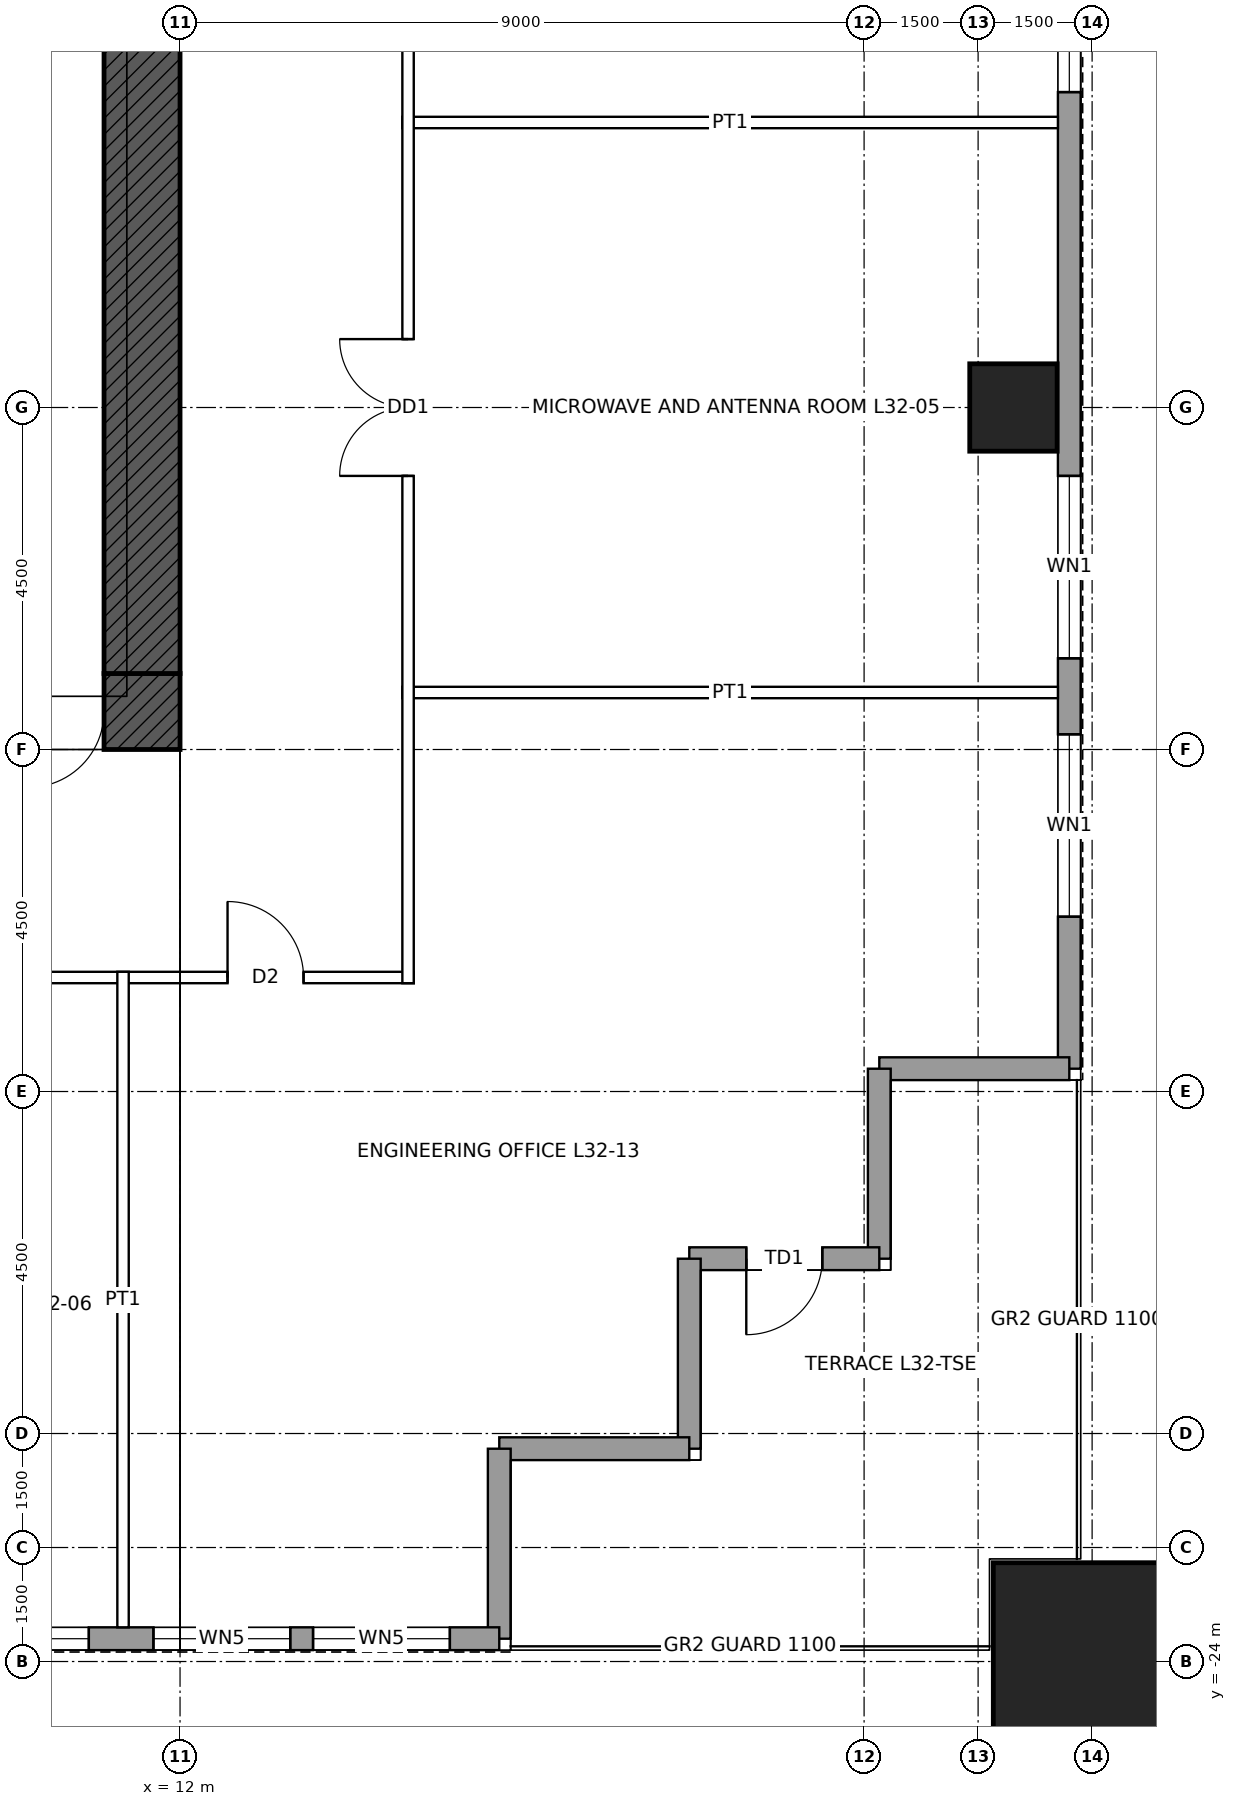
"""IFC4 building model, lengths in metres.
Left out: names, types, materials, properties, quantities, classifications, styles, units other than length and angle.
Written with IfcOpenShell. Run it as: python <this file> out.ifc"""

import sys

from ifc_helpers import new_model, si_unit, direction, frame, frame_2d, origin, origin_2d, place, context, subcontext, project, spatial, rectangle, hollow_rectangle, extrude, element, fill, save


model = new_model("IFC4")
c1 = context("Model", 3, precision=1e-05, world=origin(), true_north=direction((0.0, 1.0)))
c2 = subcontext(c1, "Body", "Model", "MODEL_VIEW")
j1 = project(units=[si_unit("LENGTHUNIT", "METRE"), si_unit("PLANEANGLEUNIT", "RADIAN")], contexts=[c1])
p1 = place(None, origin())
s1 = spatial("IfcSite", under=j1, at=p1, CompositionType="ELEMENT")
p2 = place(p1, origin())
s2 = spatial("IfcBuilding", under=s1, at=p2, CompositionType="ELEMENT")
p3 = place(p2, frame((0.0, 0.0, 158.4)))
s3 = spatial("IfcBuildingStorey", under=s2, at=p3, CompositionType="ELEMENT", Elevation=158.4)
p4 = place(p3, frame((24.0, -24.0, 0.0), z_axis=(0.0, 0.0, 1.0), x_axis=(1.0, 0.0, 0.0)))
e1 = element("IfcColumn", 1, at=p4, inside=s3, PredefinedType="COLUMN", context=c2, shape_type="SweptSolid", body=[
    extrude(hollow_rectangle(XDim=2.6, YDim=2.6, WallThickness=0.13, at=origin_2d()), origin(), (0.0, 0.0, 1.0), 4.5),
])
p5 = place(p3, frame((22.965, -7.5, 0.0), z_axis=(0.0, 0.0, 1.0), x_axis=(1.0, 0.0, 0.0)))
e2 = element("IfcColumn", 2, at=p5, inside=s3, PredefinedType="COLUMN", context=c2, shape_type="SweptSolid", body=[
    extrude(hollow_rectangle(XDim=1.15, YDim=1.15, WallThickness=0.075, at=origin_2d()), origin(), (0.0, 0.0, 1.0), 4.5),
])
p6 = place(p3, frame((12.0, -11.5, 0.0), z_axis=(0.0, 0.0, 1.0), x_axis=(-1.0, 0.0, 0.0)))
e3 = element("IfcWall", 3, at=p6, inside=s3, PredefinedType="SHEAR", context=c2, shape_type="SweptSolid", body=[
    extrude(rectangle(XDim=24.0, YDim=1.0, at=frame_2d((12.0, 0.0))), origin(), (0.0, 0.0, 1.0), 4.5),
])
p7 = place(p6, frame((11.5, 0.0, 0.0)))
e4 = element("IfcOpeningElement", 4, at=p7, cuts=e3, PredefinedType="OPENING", context=c2, shape_type="SweptSolid", body=[
    extrude(rectangle(XDim=1.0, YDim=2.1, at=frame_2d((0.5, 1.05))), frame((0.0, 0.51, 0.0), z_axis=(0.0, -1.0, 0.0), x_axis=(1.0, 0.0, 0.0)), (0.0, 0.0, 1.0), 1.02),
])
p8 = place(p6, frame((1.0, 0.0, 0.0)))
e5 = element("IfcOpeningElement", 5, at=p8, cuts=e3, PredefinedType="OPENING", context=c2, shape_type="SweptSolid", body=[
    extrude(rectangle(XDim=1.0, YDim=2.4, at=frame_2d((0.5, 1.2))), frame((0.0, 0.51, 0.0), z_axis=(0.0, -1.0, 0.0), x_axis=(1.0, 0.0, 0.0)), (0.0, 0.0, 1.0), 1.02),
])
p9 = place(p3, frame((11.5, 11.0, 0.0), z_axis=(0.0, 0.0, 1.0), x_axis=(0.0, -1.0, 0.0)))
e6 = element("IfcWall", 6, at=p9, inside=s3, PredefinedType="SHEAR", context=c2, shape_type="SweptSolid", body=[
    extrude(rectangle(XDim=22.0, YDim=1.0, at=frame_2d((11.0, 0.0))), origin(), (0.0, 0.0, 1.0), 4.5),
])
p10 = place(p9, frame((10.5, 0.0, 0.0)))
e7 = element("IfcOpeningElement", 7, at=p10, cuts=e6, PredefinedType="OPENING", context=c2, shape_type="SweptSolid", body=[
    extrude(rectangle(XDim=1.0, YDim=2.4, at=frame_2d((0.5, 1.2))), frame((0.0, 0.51, 0.0), z_axis=(0.0, -1.0, 0.0), x_axis=(1.0, 0.0, 0.0)), (0.0, 0.0, 1.0), 1.02),
])
p11 = place(p3, frame((23.7, 16.2, 0.0), z_axis=(0.0, 0.0, 1.0), x_axis=(0.0, -1.0, 0.0)))
e8 = element("IfcWall", 8, at=p11, inside=s3, PredefinedType="SOLIDWALL", context=c2, shape_type="SweptSolid", body=[
    extrude(rectangle(XDim=32.4, YDim=0.3, at=frame_2d((16.2, 0.0))), origin(), (0.0, 0.0, 1.0), 4.3),
])
p12 = place(p11, frame((2.0, 0.0, 1.0)))
e9 = element("IfcOpeningElement", 9, at=p12, cuts=e8, PredefinedType="OPENING", context=c2, shape_type="SweptSolid", body=[
    extrude(rectangle(XDim=2.4, YDim=1.2, at=frame_2d((1.2, 0.6))), frame((0.0, 0.16, 0.0), z_axis=(0.0, -1.0, 0.0), x_axis=(1.0, 0.0, 0.0)), (0.0, 0.0, 1.0), 0.32),
])
p13 = place(p11, frame((5.4, 0.0, 1.0)))
e10 = element("IfcOpeningElement", 10, at=p13, cuts=e8, PredefinedType="OPENING", context=c2, shape_type="SweptSolid", body=[
    extrude(rectangle(XDim=2.4, YDim=1.2, at=frame_2d((1.2, 0.6))), frame((0.0, 0.16, 0.0), z_axis=(0.0, -1.0, 0.0), x_axis=(1.0, 0.0, 0.0)), (0.0, 0.0, 1.0), 0.32),
])
p14 = place(p11, frame((10.45, 0.0, 1.0)))
e11 = element("IfcOpeningElement", 11, at=p14, cuts=e8, PredefinedType="OPENING", context=c2, shape_type="SweptSolid", body=[
    extrude(rectangle(XDim=1.8, YDim=1.2, at=frame_2d((0.9, 0.6))), frame((0.0, 0.16, 0.0), z_axis=(0.0, -1.0, 0.0), x_axis=(1.0, 0.0, 0.0)), (0.0, 0.0, 1.0), 0.32),
])
p15 = place(p11, frame((12.95, 0.0, 1.0)))
e12 = element("IfcOpeningElement", 12, at=p15, cuts=e8, PredefinedType="OPENING", context=c2, shape_type="SweptSolid", body=[
    extrude(rectangle(XDim=2.4, YDim=1.2, at=frame_2d((1.2, 0.6))), frame((0.0, 0.16, 0.0), z_axis=(0.0, -1.0, 0.0), x_axis=(1.0, 0.0, 0.0)), (0.0, 0.0, 1.0), 0.32),
])
p16 = place(p11, frame((15.65, 0.0, 1.0)))
e13 = element("IfcOpeningElement", 13, at=p16, cuts=e8, PredefinedType="OPENING", context=c2, shape_type="SweptSolid", body=[
    extrude(rectangle(XDim=1.8, YDim=1.2, at=frame_2d((0.9, 0.6))), frame((0.0, 0.16, 0.0), z_axis=(0.0, -1.0, 0.0), x_axis=(1.0, 0.0, 0.0)), (0.0, 0.0, 1.0), 0.32),
])
p17 = place(p11, frame((17.75, 0.0, 1.0)))
e14 = element("IfcOpeningElement", 14, at=p17, cuts=e8, PredefinedType="OPENING", context=c2, shape_type="SweptSolid", body=[
    extrude(rectangle(XDim=1.8, YDim=1.2, at=frame_2d((0.9, 0.6))), frame((0.0, 0.16, 0.0), z_axis=(0.0, -1.0, 0.0), x_axis=(1.0, 0.0, 0.0)), (0.0, 0.0, 1.0), 0.32),
])
p18 = place(p11, frame((24.6, 0.0, 1.0)))
e15 = element("IfcOpeningElement", 15, at=p18, cuts=e8, PredefinedType="OPENING", context=c2, shape_type="SweptSolid", body=[
    extrude(rectangle(XDim=2.4, YDim=1.2, at=frame_2d((1.2, 0.6))), frame((0.0, 0.16, 0.0), z_axis=(0.0, -1.0, 0.0), x_axis=(1.0, 0.0, 0.0)), (0.0, 0.0, 1.0), 0.32),
])
p19 = place(p11, frame((28.0, 0.0, 1.0)))
e16 = element("IfcOpeningElement", 16, at=p19, cuts=e8, PredefinedType="OPENING", context=c2, shape_type="SweptSolid", body=[
    extrude(rectangle(XDim=2.4, YDim=1.2, at=frame_2d((1.2, 0.6))), frame((0.0, 0.16, 0.0), z_axis=(0.0, -1.0, 0.0), x_axis=(1.0, 0.0, 0.0)), (0.0, 0.0, 1.0), 0.32),
])
for number, where, z_axis, x_axis in (
    (17, (23.7, -16.2, 0.0), (0.0, 0.0, 1.0), (-1.0, 0.0, 0.0)),
    (18, (21.2, -16.2, 0.0), (0.0, 0.0, 1.0), (0.0, -1.0, 0.0)),
):
    element("IfcWall", number, at=place(p3, frame(where, z_axis=z_axis, x_axis=x_axis)), inside=s3, PredefinedType="SOLIDWALL", context=c2, shape_type="SweptSolid", body=[
        extrude(rectangle(XDim=2.5, YDim=0.3, at=frame_2d((1.25, 0.0))), origin(), (0.0, 0.0, 1.0), 4.3),
    ])
p20 = place(p3, frame((21.2, -18.7, 0.0), z_axis=(0.0, 0.0, 1.0), x_axis=(-1.0, 0.0, 0.0)))
e19 = element("IfcWall", 19, at=p20, inside=s3, PredefinedType="SOLIDWALL", context=c2, shape_type="SweptSolid", body=[
    extrude(rectangle(XDim=2.5, YDim=0.3, at=frame_2d((1.25, 0.0))), origin(), (0.0, 0.0, 1.0), 4.3),
])
p21 = place(p20, frame((0.75, 0.0, 0.0)))
e20 = element("IfcOpeningElement", 20, at=p21, cuts=e19, PredefinedType="OPENING", context=c2, shape_type="SweptSolid", body=[
    extrude(rectangle(XDim=1.0, YDim=2.4, at=frame_2d((0.5, 1.2))), frame((0.0, 0.16, 0.0), z_axis=(0.0, -1.0, 0.0), x_axis=(1.0, 0.0, 0.0)), (0.0, 0.0, 1.0), 0.32),
])
for number, where, z_axis, x_axis in (
    (21, (18.7, -18.7, 0.0), (0.0, 0.0, 1.0), (0.0, -1.0, 0.0)),
    (22, (18.7, -21.2, 0.0), (0.0, 0.0, 1.0), (-1.0, 0.0, 0.0)),
    (23, (16.2, -21.2, 0.0), (0.0, 0.0, 1.0), (0.0, -1.0, 0.0)),
):
    element("IfcWall", number, at=place(p3, frame(where, z_axis=z_axis, x_axis=x_axis)), inside=s3, PredefinedType="SOLIDWALL", context=c2, shape_type="SweptSolid", body=[
        extrude(rectangle(XDim=2.5, YDim=0.3, at=frame_2d((1.25, 0.0))), origin(), (0.0, 0.0, 1.0), 4.3),
    ])
p22 = place(p3, frame((16.2, -23.7, 0.0), z_axis=(0.0, 0.0, 1.0), x_axis=(-1.0, 0.0, 0.0)))
e24 = element("IfcWall", 24, at=p22, inside=s3, PredefinedType="SOLIDWALL", context=c2, shape_type="SweptSolid", body=[
    extrude(rectangle(XDim=32.4, YDim=0.3, at=frame_2d((16.2, 0.0))), origin(), (0.0, 0.0, 1.0), 4.3),
])
p23 = place(p22, frame((0.65, 0.0, 1.0)))
e25 = element("IfcOpeningElement", 25, at=p23, cuts=e24, PredefinedType="OPENING", context=c2, shape_type="SweptSolid", body=[
    extrude(rectangle(XDim=1.8, YDim=1.2, at=frame_2d((0.9, 0.6))), frame((0.0, 0.16, 0.0), z_axis=(0.0, -1.0, 0.0), x_axis=(1.0, 0.0, 0.0)), (0.0, 0.0, 1.0), 0.32),
])
p24 = place(p22, frame((2.75, 0.0, 1.0)))
e26 = element("IfcOpeningElement", 26, at=p24, cuts=e24, PredefinedType="OPENING", context=c2, shape_type="SweptSolid", body=[
    extrude(rectangle(XDim=1.8, YDim=1.2, at=frame_2d((0.9, 0.6))), frame((0.0, 0.16, 0.0), z_axis=(0.0, -1.0, 0.0), x_axis=(1.0, 0.0, 0.0)), (0.0, 0.0, 1.0), 0.32),
])
p25 = place(p22, frame((5.4, 0.0, 1.0)))
e27 = element("IfcOpeningElement", 27, at=p25, cuts=e24, PredefinedType="OPENING", context=c2, shape_type="SweptSolid", body=[
    extrude(rectangle(XDim=2.4, YDim=1.2, at=frame_2d((1.2, 0.6))), frame((0.0, 0.16, 0.0), z_axis=(0.0, -1.0, 0.0), x_axis=(1.0, 0.0, 0.0)), (0.0, 0.0, 1.0), 0.32),
])
p26 = place(p22, frame((12.95, 0.0, 1.0)))
e28 = element("IfcOpeningElement", 28, at=p26, cuts=e24, PredefinedType="OPENING", context=c2, shape_type="SweptSolid", body=[
    extrude(rectangle(XDim=2.4, YDim=1.2, at=frame_2d((1.2, 0.6))), frame((0.0, 0.16, 0.0), z_axis=(0.0, -1.0, 0.0), x_axis=(1.0, 0.0, 0.0)), (0.0, 0.0, 1.0), 0.32),
])
p27 = place(p22, frame((15.65, 0.0, 1.0)))
e29 = element("IfcOpeningElement", 29, at=p27, cuts=e24, PredefinedType="OPENING", context=c2, shape_type="SweptSolid", body=[
    extrude(rectangle(XDim=1.8, YDim=1.2, at=frame_2d((0.9, 0.6))), frame((0.0, 0.16, 0.0), z_axis=(0.0, -1.0, 0.0), x_axis=(1.0, 0.0, 0.0)), (0.0, 0.0, 1.0), 0.32),
])
p28 = place(p22, frame((17.75, 0.0, 1.0)))
e30 = element("IfcOpeningElement", 30, at=p28, cuts=e24, PredefinedType="OPENING", context=c2, shape_type="SweptSolid", body=[
    extrude(rectangle(XDim=1.8, YDim=1.2, at=frame_2d((0.9, 0.6))), frame((0.0, 0.16, 0.0), z_axis=(0.0, -1.0, 0.0), x_axis=(1.0, 0.0, 0.0)), (0.0, 0.0, 1.0), 0.32),
])
p29 = place(p22, frame((24.6, 0.0, 1.0)))
e31 = element("IfcOpeningElement", 31, at=p29, cuts=e24, PredefinedType="OPENING", context=c2, shape_type="SweptSolid", body=[
    extrude(rectangle(XDim=2.4, YDim=1.2, at=frame_2d((1.2, 0.6))), frame((0.0, 0.16, 0.0), z_axis=(0.0, -1.0, 0.0), x_axis=(1.0, 0.0, 0.0)), (0.0, 0.0, 1.0), 0.32),
])
p30 = place(p22, frame((28.0, 0.0, 1.0)))
e32 = element("IfcOpeningElement", 32, at=p30, cuts=e24, PredefinedType="OPENING", context=c2, shape_type="SweptSolid", body=[
    extrude(rectangle(XDim=2.4, YDim=1.2, at=frame_2d((1.2, 0.6))), frame((0.0, 0.16, 0.0), z_axis=(0.0, -1.0, 0.0), x_axis=(1.0, 0.0, 0.0)), (0.0, 0.0, 1.0), 0.32),
])
p31 = place(p3, frame((-15.075, -15.0, 0.0), z_axis=(0.0, 0.0, 1.0), x_axis=(1.0, 0.0, 0.0)))
e33 = element("IfcWall", 33, at=p31, inside=s3, PredefinedType="PARTITIONING", context=c2, shape_type="SweptSolid", body=[
    extrude(rectangle(XDim=30.15, YDim=0.15, at=frame_2d((15.075, 0.0))), origin(), (0.0, 0.0, 1.0), 4.3),
])
p32 = place(p31, frame((21.675, 0.0, 0.0)))
e34 = element("IfcOpeningElement", 34, at=p32, cuts=e33, PredefinedType="OPENING", context=c2, shape_type="SweptSolid", body=[
    extrude(rectangle(XDim=1.8, YDim=2.4, at=frame_2d((0.9, 1.2))), frame((0.0, 0.085, 0.0), z_axis=(0.0, -1.0, 0.0), x_axis=(1.0, 0.0, 0.0)), (0.0, 0.0, 1.0), 0.17),
])
p33 = place(p31, frame((14.575, 0.0, 0.0)))
e35 = element("IfcOpeningElement", 35, at=p33, cuts=e33, PredefinedType="OPENING", context=c2, shape_type="SweptSolid", body=[
    extrude(rectangle(XDim=1.0, YDim=2.1, at=frame_2d((0.5, 1.05))), frame((0.0, 0.085, 0.0), z_axis=(0.0, -1.0, 0.0), x_axis=(1.0, 0.0, 0.0)), (0.0, 0.0, 1.0), 0.17),
])
p34 = place(p31, frame((6.675, 0.0, 0.0)))
e36 = element("IfcOpeningElement", 36, at=p34, cuts=e33, PredefinedType="OPENING", context=c2, shape_type="SweptSolid", body=[
    extrude(rectangle(XDim=1.8, YDim=2.4, at=frame_2d((0.9, 1.2))), frame((0.0, 0.085, 0.0), z_axis=(0.0, -1.0, 0.0), x_axis=(1.0, 0.0, 0.0)), (0.0, 0.0, 1.0), 0.17),
])
p35 = place(p31, frame((27.7, 0.0, 0.0)))
e37 = element("IfcOpeningElement", 37, at=p35, cuts=e33, PredefinedType="OPENING", context=c2, shape_type="SweptSolid", body=[
    extrude(rectangle(XDim=1.0, YDim=2.1, at=frame_2d((0.5, 1.05))), frame((0.0, 0.085, 0.0), z_axis=(0.0, -1.0, 0.0), x_axis=(1.0, 0.0, 0.0)), (0.0, 0.0, 1.0), 0.17),
])
p36 = place(p31, frame((1.45, 0.0, 0.0)))
e38 = element("IfcOpeningElement", 38, at=p36, cuts=e33, PredefinedType="OPENING", context=c2, shape_type="SweptSolid", body=[
    extrude(rectangle(XDim=1.0, YDim=2.1, at=frame_2d((0.5, 1.05))), frame((0.0, 0.085, 0.0), z_axis=(0.0, -1.0, 0.0), x_axis=(1.0, 0.0, 0.0)), (0.0, 0.0, 1.0), 0.17),
])
for number, where, z_axis, x_axis in (
    (39, (14.925, -11.25, 0.0), (0.0, 0.0, 1.0), (1.0, 0.0, 0.0)),
    (40, (14.925, -3.75, 0.0), (0.0, 0.0, 1.0), (1.0, 0.0, 0.0)),
    (41, (11.25, -23.55, 0.0), (0.0, 0.0, 1.0), (0.0, 1.0, 0.0)),
):
    element("IfcWall", number, at=place(p3, frame(where, z_axis=z_axis, x_axis=x_axis)), inside=s3, PredefinedType="PARTITIONING", context=c2, shape_type="SweptSolid", body=[
        extrude(rectangle(XDim=8.625, YDim=0.15, at=frame_2d((4.312, 0.0))), origin(), (0.0, 0.0, 1.0), 3.431),
    ])
p37 = place(p3, frame((15.0, -15.075, 0.0), z_axis=(0.0, 0.0, 1.0), x_axis=(0.0, 1.0, 0.0)))
e42 = element("IfcWall", 42, at=p37, inside=s3, PredefinedType="PARTITIONING", context=c2, shape_type="SweptSolid", body=[
    extrude(rectangle(XDim=30.15, YDim=0.15, at=frame_2d((15.075, 0.0))), origin(), (0.0, 0.0, 1.0), 4.3),
])
p38 = place(p37, frame((17.925, 0.0, 0.0)))
e43 = element("IfcOpeningElement", 43, at=p38, cuts=e42, PredefinedType="OPENING", context=c2, shape_type="SweptSolid", body=[
    extrude(rectangle(XDim=1.8, YDim=2.4, at=frame_2d((0.9, 1.2))), frame((0.0, 0.085, 0.0), z_axis=(0.0, -1.0, 0.0), x_axis=(1.0, 0.0, 0.0)), (0.0, 0.0, 1.0), 0.17),
])
p39 = place(p37, frame((6.675, 0.0, 0.0)))
e44 = element("IfcOpeningElement", 44, at=p39, cuts=e42, PredefinedType="OPENING", context=c2, shape_type="SweptSolid", body=[
    extrude(rectangle(XDim=1.8, YDim=2.4, at=frame_2d((0.9, 1.2))), frame((0.0, 0.085, 0.0), z_axis=(0.0, -1.0, 0.0), x_axis=(1.0, 0.0, 0.0)), (0.0, 0.0, 1.0), 0.17),
])
p40 = place(p17, origin())
e45 = element("IfcWindow", 45, at=p40, inside=s3, PartitioningType="SINGLE_PANEL", PredefinedType="WINDOW", context=c2, shape_type="SweptSolid", body=[
    extrude(rectangle(XDim=1.8, YDim=1.2, at=frame_2d((0.9, 0.6))), frame((0.0, 0.03, 0.0), z_axis=(0.0, -1.0, 0.0), x_axis=(1.0, 0.0, 0.0)), (0.0, 0.0, 1.0), 0.06),
])
fill(e14, e45)
p41 = place(p18, origin())
e46 = element("IfcWindow", 46, at=p41, inside=s3, PartitioningType="SINGLE_PANEL", PredefinedType="WINDOW", context=c2, shape_type="SweptSolid", body=[
    extrude(rectangle(XDim=2.4, YDim=1.2, at=frame_2d((1.2, 0.6))), frame((0.0, 0.03, 0.0), z_axis=(0.0, -1.0, 0.0), x_axis=(1.0, 0.0, 0.0)), (0.0, 0.0, 1.0), 0.06),
])
fill(e15, e46)
p42 = place(p19, origin())
e47 = element("IfcWindow", 47, at=p42, inside=s3, PartitioningType="SINGLE_PANEL", PredefinedType="WINDOW", context=c2, shape_type="SweptSolid", body=[
    extrude(rectangle(XDim=2.4, YDim=1.2, at=frame_2d((1.2, 0.6))), frame((0.0, 0.03, 0.0), z_axis=(0.0, -1.0, 0.0), x_axis=(1.0, 0.0, 0.0)), (0.0, 0.0, 1.0), 0.06),
])
fill(e16, e47)
p43 = place(p21, origin())
e48 = element("IfcDoor", 48, at=p43, inside=s3, OperationType="SINGLE_SWING_RIGHT", PredefinedType="DOOR", context=c2, shape_type="SweptSolid", body=[
    extrude(rectangle(XDim=1.0, YDim=2.4, at=frame_2d((0.5, 1.2))), frame((0.0, 0.025, 0.0), z_axis=(0.0, -1.0, 0.0), x_axis=(1.0, 0.0, 0.0)), (0.0, 0.0, 1.0), 0.05),
])
fill(e20, e48)
p44 = place(p23, origin())
e49 = element("IfcWindow", 49, at=p44, inside=s3, PartitioningType="SINGLE_PANEL", PredefinedType="WINDOW", context=c2, shape_type="SweptSolid", body=[
    extrude(rectangle(XDim=1.8, YDim=1.2, at=frame_2d((0.9, 0.6))), frame((0.0, 0.03, 0.0), z_axis=(0.0, -1.0, 0.0), x_axis=(1.0, 0.0, 0.0)), (0.0, 0.0, 1.0), 0.06),
])
fill(e25, e49)
p45 = place(p24, origin())
e50 = element("IfcWindow", 50, at=p45, inside=s3, PartitioningType="SINGLE_PANEL", PredefinedType="WINDOW", context=c2, shape_type="SweptSolid", body=[
    extrude(rectangle(XDim=1.8, YDim=1.2, at=frame_2d((0.9, 0.6))), frame((0.0, 0.03, 0.0), z_axis=(0.0, -1.0, 0.0), x_axis=(1.0, 0.0, 0.0)), (0.0, 0.0, 1.0), 0.06),
])
fill(e26, e50)
p46 = place(p25, origin())
e51 = element("IfcWindow", 51, at=p46, inside=s3, PartitioningType="SINGLE_PANEL", PredefinedType="WINDOW", context=c2, shape_type="SweptSolid", body=[
    extrude(rectangle(XDim=2.4, YDim=1.2, at=frame_2d((1.2, 0.6))), frame((0.0, 0.03, 0.0), z_axis=(0.0, -1.0, 0.0), x_axis=(1.0, 0.0, 0.0)), (0.0, 0.0, 1.0), 0.06),
])
fill(e27, e51)
p47 = place(p8, origin())
e52 = element("IfcDoor", 52, at=p47, inside=s3, OperationType="SINGLE_SWING_RIGHT", PredefinedType="DOOR", context=c2, shape_type="SweptSolid", body=[
    extrude(rectangle(XDim=1.0, YDim=2.4, at=frame_2d((0.5, 1.2))), frame((0.0, 0.485, 0.0), z_axis=(0.0, -1.0, 0.0), x_axis=(1.0, 0.0, 0.0)), (0.0, 0.0, 1.0), 0.05),
])
fill(e5, e52)
p48 = place(p39, origin())
e53 = element("IfcDoor", 53, at=p48, inside=s3, OperationType="DOUBLE_DOOR_SINGLE_SWING", PredefinedType="DOOR", context=c2, shape_type="SweptSolid", body=[
    extrude(rectangle(XDim=1.8, YDim=2.4, at=frame_2d((0.9, 1.2))), frame((0.0, 0.025, 0.0), z_axis=(0.0, -1.0, 0.0), x_axis=(1.0, 0.0, 0.0)), (0.0, 0.0, 1.0), 0.05),
])
fill(e44, e53)
p49 = place(p35, origin())
e54 = element("IfcDoor", 54, at=p49, inside=s3, OperationType="SINGLE_SWING_LEFT", PredefinedType="DOOR", context=c2, shape_type="SweptSolid", body=[
    extrude(rectangle(XDim=1.0, YDim=2.1, at=frame_2d((0.5, 1.05))), frame((0.0, 0.025, 0.0), z_axis=(0.0, -1.0, 0.0), x_axis=(1.0, 0.0, 0.0)), (0.0, 0.0, 1.0), 0.05),
])
fill(e37, e54)
save(model, sys.argv[1])
